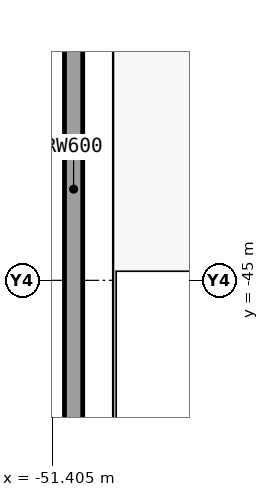
"""IFC4 building model, lengths in metres.
Left out: names, types, materials, properties, quantities, classifications, styles, units other than length and angle.
Written with IfcOpenShell. Run it as: python <this file> out.ifc"""

import sys

from ifc_helpers import new_model, si_unit, direction, frame, origin, place, context, subcontext, project, spatial, polyline, outline, extrude, element, save


model = new_model("IFC4")
c1 = context("Model", 3, precision=1e-05, world=origin(), true_north=direction((0.0, 1.0)))
c2 = subcontext(c1, "Body", "Model", "MODEL_VIEW")
j1 = project(units=[si_unit("LENGTHUNIT", "METRE"), si_unit("PLANEANGLEUNIT", "RADIAN")], contexts=[c1])
p1 = place(None, origin())
s1 = spatial("IfcSite", under=j1, at=p1, CompositionType="ELEMENT")
p2 = place(p1, origin())
s2 = spatial("IfcBuilding", under=s1, at=p2, CompositionType="ELEMENT")
p3 = place(p2, frame((0.0, 0.0, -9.0)))
s3 = spatial("IfcBuildingStorey", under=s2, at=p3, CompositionType="ELEMENT", Elevation=-9.0)
p4 = place(p3, frame((-50.7, -1.0, 0.0), z_axis=(0.0, 0.0, 1.0), x_axis=(0.0, -1.0, 0.0)))
e1 = element("IfcWall", 1, at=p4, inside=s3, PredefinedType="SOLIDWALL", context=c2, shape_type="SweptSolid", body=[
    extrude(outline(polyline([(81.4, 0.3), (81.4, -0.3), (0.6, -0.3), (0.6, 0.3), (81.4, 0.3)])), origin(), (0.0, 0.0, 1.0), 4.5),
])
save(model, sys.argv[1])
